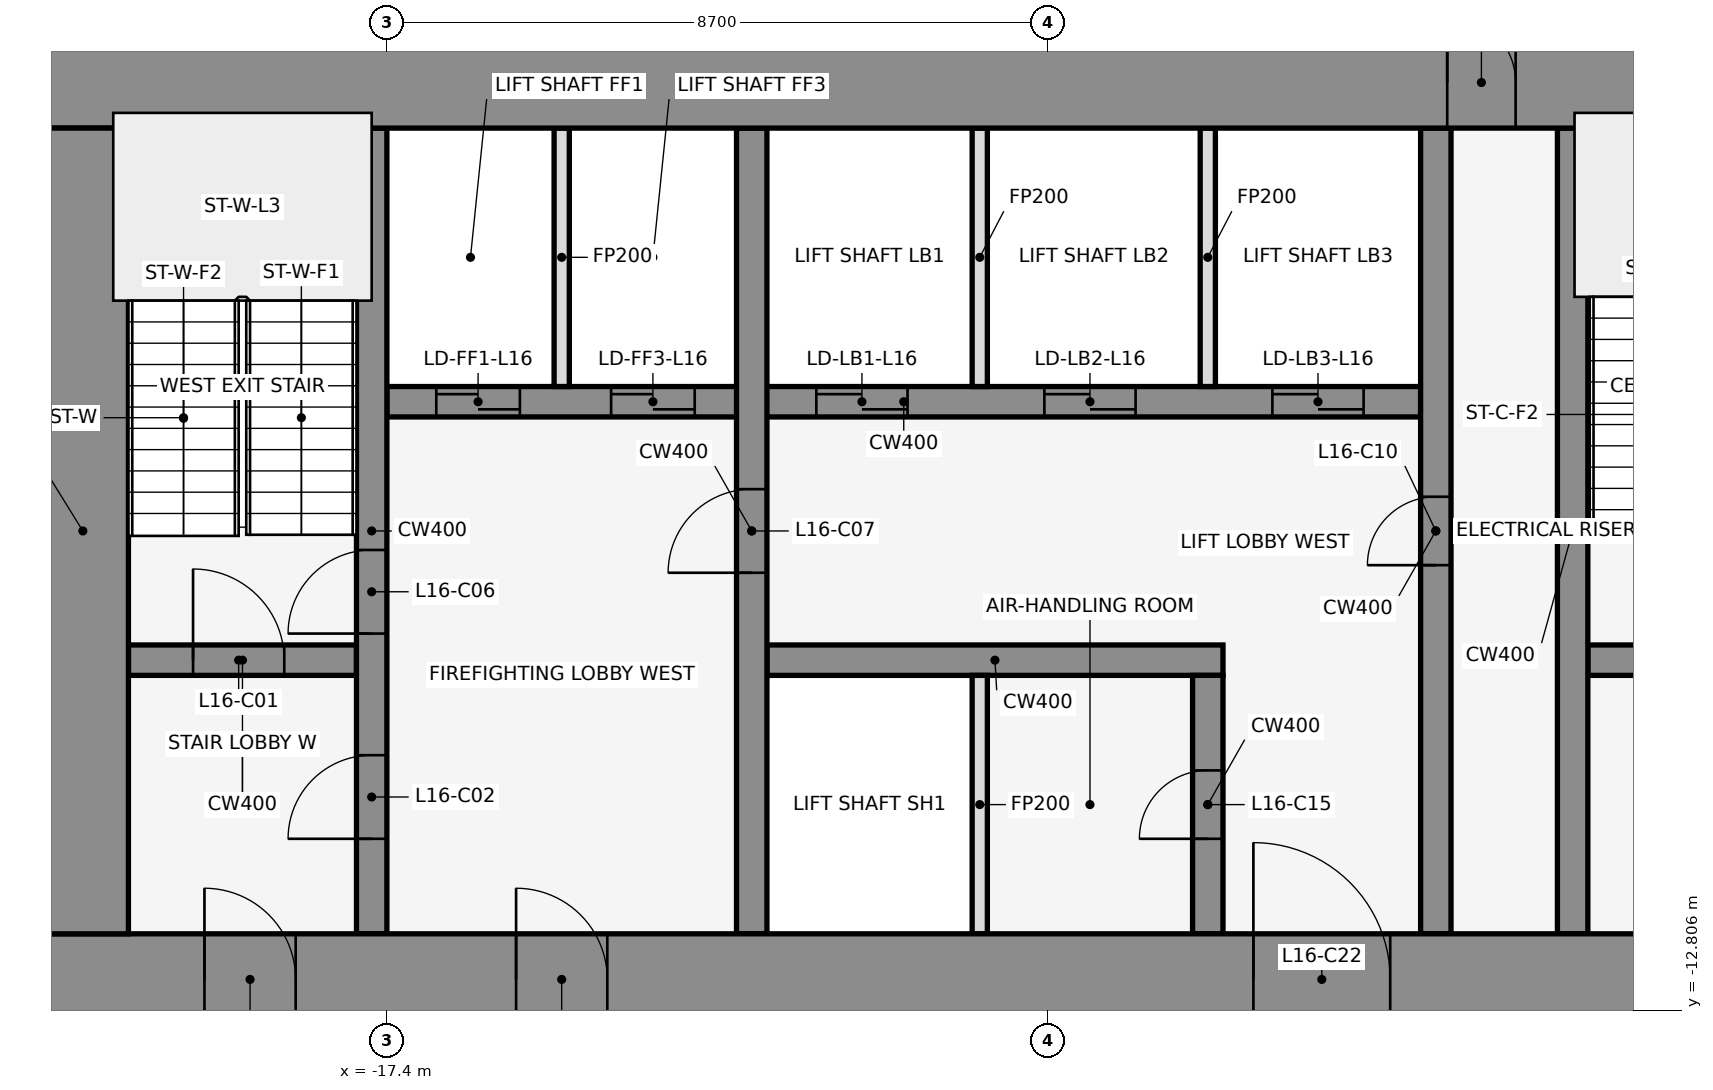
"""IFC4 building model, lengths in metres.
Left out: names, types, materials, properties, quantities, classifications, styles, units other than length and angle.
Written with IfcOpenShell. Run it as: python <this file> out.ifc"""

import sys

from ifc_helpers import new_model, si_unit, direction, frame, frame_2d, origin, place, context, subcontext, project, spatial, rectangle, extrude, element, fill, save


model = new_model("IFC4")
c1 = context("Model", 3, precision=1e-05, world=origin(), true_north=direction((0.0, 1.0)))
c2 = subcontext(c1, "Body", "Model", "MODEL_VIEW")
j1 = project(units=[si_unit("LENGTHUNIT", "METRE"), si_unit("PLANEANGLEUNIT", "RADIAN")], contexts=[c1])
p1 = place(None, origin())
s1 = spatial("IfcSite", under=j1, at=p1, CompositionType="ELEMENT")
p2 = place(p1, origin())
s2 = spatial("IfcBuilding", under=s1, at=p2, CompositionType="ELEMENT")
p3 = place(p2, frame((0.0, 0.0, 80.0)))
s3 = spatial("IfcBuildingStorey", under=s2, at=p3, CompositionType="ELEMENT", Elevation=80.0)
for number, where, z_axis, x_axis in (
    (1, (-0.068, -0.105, 0.0), (0.0, 0.0, 1.0), (-0.84, 0.543, 0.0)),
    (2, (-14.599, 1.08, 0.0), (0.0, 0.0, 1.0), (-0.84, -0.543, 0.0)),
):
    element("IfcWall", number, at=place(p3, frame(where, z_axis=z_axis, x_axis=x_axis)), inside=s3, PredefinedType="STANDARD", context=c2, shape_type="SweptSolid", body=[
        extrude(rectangle(XDim=2.183, YDim=0.25, at=frame_2d((1.091, 0.0))), origin(), (0.0, 0.0, 1.0), 4.3),
    ])
p4 = place(p3, frame((-20.8, -8.2, 0.0), z_axis=(0.0, 0.0, 1.0), x_axis=(1.0, 0.0, 0.0)))
e3 = element("IfcWall", 3, at=p4, inside=s3, PredefinedType="SHEAR", context=c2, shape_type="SweptSolid", body=[
    extrude(rectangle(XDim=3.0, YDim=0.4, at=frame_2d((1.5, 0.0))), origin(), (0.0, 0.0, 1.0), 4.5),
])
p5 = place(p4, frame((0.85, 0.0, 0.0)))
e4 = element("IfcOpeningElement", 4, at=p5, cuts=e3, PredefinedType="OPENING", context=c2, shape_type="SweptSolid", body=[
    extrude(rectangle(XDim=1.2, YDim=2.1, at=frame_2d((0.6, 1.05))), frame((0.0, 0.212, 0.0), z_axis=(0.0, -1.0, 0.0), x_axis=(1.0, 0.0, 0.0)), (0.0, 0.0, 1.0), 0.424),
])
p6 = place(p3, frame((-12.4, -8.2, 0.0), z_axis=(0.0, 0.0, 1.0), x_axis=(1.0, 0.0, 0.0)))
e5 = element("IfcWall", 5, at=p6, inside=s3, PredefinedType="SHEAR", context=c2, shape_type="SweptSolid", body=[
    extrude(rectangle(XDim=6.0, YDim=0.4, at=frame_2d((3.0, 0.0))), origin(), (0.0, 0.0, 1.0), 4.5),
])
p7 = place(p3, frame((-1.6, -8.2, 0.0), z_axis=(0.0, 0.0, 1.0), x_axis=(1.0, 0.0, 0.0)))
e6 = element("IfcWall", 6, at=p7, inside=s3, PredefinedType="SHEAR", context=c2, shape_type="SweptSolid", body=[
    extrude(rectangle(XDim=3.2, YDim=0.4, at=frame_2d((1.6, 0.0))), origin(), (0.0, 0.0, 1.0), 4.5),
])
p8 = place(p7, frame((1.05, 0.0, 0.0)))
e7 = element("IfcOpeningElement", 7, at=p8, cuts=e6, PredefinedType="OPENING", context=c2, shape_type="SweptSolid", body=[
    extrude(rectangle(XDim=1.2, YDim=2.1, at=frame_2d((0.6, 1.05))), frame((0.0, 0.212, 0.0), z_axis=(0.0, -1.0, 0.0), x_axis=(1.0, 0.0, 0.0)), (0.0, 0.0, 1.0), 0.424),
])
p9 = place(p3, frame((-17.4, -4.8, 0.0), z_axis=(0.0, 0.0, 1.0), x_axis=(1.0, 0.0, 0.0)))
e8 = element("IfcWall", 8, at=p9, inside=s3, PredefinedType="SHEAR", context=c2, shape_type="SweptSolid", body=[
    extrude(rectangle(XDim=13.6, YDim=0.4, at=frame_2d((6.8, 0.0))), origin(), (0.0, 0.0, 1.0), 4.5),
])
p10 = place(p9, frame((0.65, 0.0, 0.0)))
e9 = element("IfcOpeningElement", 9, at=p10, cuts=e8, PredefinedType="OPENING", context=c2, shape_type="SweptSolid", body=[
    extrude(rectangle(XDim=1.1, YDim=2.1, at=frame_2d((0.55, 1.05))), frame((0.0, 0.212, 0.0), z_axis=(0.0, -1.0, 0.0), x_axis=(1.0, 0.0, 0.0)), (0.0, 0.0, 1.0), 0.424),
])
p11 = place(p9, frame((2.95, 0.0, 0.0)))
e10 = element("IfcOpeningElement", 10, at=p11, cuts=e8, PredefinedType="OPENING", context=c2, shape_type="SweptSolid", body=[
    extrude(rectangle(XDim=1.1, YDim=2.1, at=frame_2d((0.55, 1.05))), frame((0.0, 0.212, 0.0), z_axis=(0.0, -1.0, 0.0), x_axis=(1.0, 0.0, 0.0)), (0.0, 0.0, 1.0), 0.424),
])
p12 = place(p9, frame((5.65, 0.0, 0.0)))
e11 = element("IfcOpeningElement", 11, at=p12, cuts=e8, PredefinedType="OPENING", context=c2, shape_type="SweptSolid", body=[
    extrude(rectangle(XDim=1.2, YDim=2.1, at=frame_2d((0.6, 1.05))), frame((0.0, 0.212, 0.0), z_axis=(0.0, -1.0, 0.0), x_axis=(1.0, 0.0, 0.0)), (0.0, 0.0, 1.0), 0.424),
])
p13 = place(p9, frame((8.65, 0.0, 0.0)))
e12 = element("IfcOpeningElement", 12, at=p13, cuts=e8, PredefinedType="OPENING", context=c2, shape_type="SweptSolid", body=[
    extrude(rectangle(XDim=1.2, YDim=2.1, at=frame_2d((0.6, 1.05))), frame((0.0, 0.212, 0.0), z_axis=(0.0, -1.0, 0.0), x_axis=(1.0, 0.0, 0.0)), (0.0, 0.0, 1.0), 0.424),
])
p14 = place(p9, frame((11.65, 0.0, 0.0)))
e13 = element("IfcOpeningElement", 13, at=p14, cuts=e8, PredefinedType="OPENING", context=c2, shape_type="SweptSolid", body=[
    extrude(rectangle(XDim=1.2, YDim=2.1, at=frame_2d((0.6, 1.05))), frame((0.0, 0.212, 0.0), z_axis=(0.0, -1.0, 0.0), x_axis=(1.0, 0.0, 0.0)), (0.0, 0.0, 1.0), 0.424),
])
p15 = place(p3, frame((-17.6, -11.8, 0.0), z_axis=(0.0, 0.0, 1.0), x_axis=(0.0, 1.0, 0.0)))
e14 = element("IfcWall", 14, at=p15, inside=s3, PredefinedType="SHEAR", context=c2, shape_type="SweptSolid", body=[
    extrude(rectangle(XDim=10.6, YDim=0.4, at=frame_2d((5.3, 0.0))), origin(), (0.0, 0.0, 1.0), 4.5),
])
p16 = place(p15, frame((1.25, 0.0, 0.0)))
e15 = element("IfcOpeningElement", 15, at=p16, cuts=e14, PredefinedType="OPENING", context=c2, shape_type="SweptSolid", body=[
    extrude(rectangle(XDim=1.1, YDim=2.1, at=frame_2d((0.55, 1.05))), frame((0.0, 0.212, 0.0), z_axis=(0.0, -1.0, 0.0), x_axis=(1.0, 0.0, 0.0)), (0.0, 0.0, 1.0), 0.424),
])
p17 = place(p15, frame((3.95, 0.0, 0.0)))
e16 = element("IfcOpeningElement", 16, at=p17, cuts=e14, PredefinedType="OPENING", context=c2, shape_type="SweptSolid", body=[
    extrude(rectangle(XDim=1.1, YDim=2.1, at=frame_2d((0.55, 1.05))), frame((0.0, 0.212, 0.0), z_axis=(0.0, -1.0, 0.0), x_axis=(1.0, 0.0, 0.0)), (0.0, 0.0, 1.0), 0.424),
])
p18 = place(p3, frame((-15.1, -4.6, 0.0), z_axis=(0.0, 0.0, 1.0), x_axis=(0.0, 1.0, 0.0)))
e17 = element("IfcWall", 17, at=p18, inside=s3, PredefinedType="PARTITIONING", context=c2, shape_type="SweptSolid", body=[
    extrude(rectangle(XDim=3.4, YDim=0.2, at=frame_2d((1.7, 0.0))), origin(), (0.0, 0.0, 1.0), 3.368),
])
p19 = place(p3, frame((-12.6, -11.8, 0.0), z_axis=(0.0, 0.0, 1.0), x_axis=(0.0, 1.0, 0.0)))
e18 = element("IfcWall", 18, at=p19, inside=s3, PredefinedType="SHEAR", context=c2, shape_type="SweptSolid", body=[
    extrude(rectangle(XDim=10.6, YDim=0.4, at=frame_2d((5.3, 0.0))), origin(), (0.0, 0.0, 1.0), 4.5),
])
p20 = place(p19, frame((4.75, 0.0, 0.0)))
e19 = element("IfcOpeningElement", 19, at=p20, cuts=e18, PredefinedType="OPENING", context=c2, shape_type="SweptSolid", body=[
    extrude(rectangle(XDim=1.1, YDim=2.1, at=frame_2d((0.55, 1.05))), frame((0.0, 0.212, 0.0), z_axis=(0.0, -1.0, 0.0), x_axis=(1.0, 0.0, 0.0)), (0.0, 0.0, 1.0), 0.424),
])
for number, where, z_axis, x_axis in (
    (20, (-9.6, -11.8, 0.0), (0.0, 0.0, 1.0), (0.0, 1.0, 0.0)),
    (21, (-9.6, -4.6, 0.0), (0.0, 0.0, 1.0), (0.0, 1.0, 0.0)),
):
    element("IfcWall", number, at=place(p3, frame(where, z_axis=z_axis, x_axis=x_axis)), inside=s3, PredefinedType="PARTITIONING", context=c2, shape_type="SweptSolid", body=[
        extrude(rectangle(XDim=3.4, YDim=0.2, at=frame_2d((1.7, 0.0))), origin(), (0.0, 0.0, 1.0), 3.368),
    ])
p21 = place(p3, frame((-6.6, -11.8, 0.0), z_axis=(0.0, 0.0, 1.0), x_axis=(0.0, 1.0, 0.0)))
e22 = element("IfcWall", 22, at=p21, inside=s3, PredefinedType="SHEAR", context=c2, shape_type="SweptSolid", body=[
    extrude(rectangle(XDim=3.4, YDim=0.4, at=frame_2d((1.7, 0.0))), origin(), (0.0, 0.0, 1.0), 4.5),
])
p22 = place(p21, frame((1.25, 0.0, 0.0)))
e23 = element("IfcOpeningElement", 23, at=p22, cuts=e22, PredefinedType="OPENING", context=c2, shape_type="SweptSolid", body=[
    extrude(rectangle(XDim=0.9, YDim=2.1, at=frame_2d((0.45, 1.05))), frame((0.0, 0.212, 0.0), z_axis=(0.0, -1.0, 0.0), x_axis=(1.0, 0.0, 0.0)), (0.0, 0.0, 1.0), 0.424),
])
p23 = place(p3, frame((-6.6, -4.6, 0.0), z_axis=(0.0, 0.0, 1.0), x_axis=(0.0, 1.0, 0.0)))
e24 = element("IfcWall", 24, at=p23, inside=s3, PredefinedType="PARTITIONING", context=c2, shape_type="SweptSolid", body=[
    extrude(rectangle(XDim=3.4, YDim=0.2, at=frame_2d((1.7, 0.0))), origin(), (0.0, 0.0, 1.0), 3.368),
])
p24 = place(p3, frame((-3.6, -11.8, 0.0), z_axis=(0.0, 0.0, 1.0), x_axis=(0.0, 1.0, 0.0)))
e25 = element("IfcWall", 25, at=p24, inside=s3, PredefinedType="SHEAR", context=c2, shape_type="SweptSolid", body=[
    extrude(rectangle(XDim=10.6, YDim=0.4, at=frame_2d((5.3, 0.0))), origin(), (0.0, 0.0, 1.0), 4.5),
])
p25 = place(p24, frame((4.85, 0.0, 0.0)))
e26 = element("IfcOpeningElement", 26, at=p25, cuts=e25, PredefinedType="OPENING", context=c2, shape_type="SweptSolid", body=[
    extrude(rectangle(XDim=0.9, YDim=2.1, at=frame_2d((0.45, 1.05))), frame((0.0, 0.212, 0.0), z_axis=(0.0, -1.0, 0.0), x_axis=(1.0, 0.0, 0.0)), (0.0, 0.0, 1.0), 0.424),
])
p26 = place(p3, frame((-1.8, -11.8, 0.0), z_axis=(0.0, 0.0, 1.0), x_axis=(0.0, 1.0, 0.0)))
e27 = element("IfcWall", 27, at=p26, inside=s3, PredefinedType="SHEAR", context=c2, shape_type="SweptSolid", body=[
    extrude(rectangle(XDim=10.6, YDim=0.4, at=frame_2d((5.3, 0.0))), origin(), (0.0, 0.0, 1.0), 4.5),
])
p27 = place(p3, frame((-22.0, -0.6, 0.0), z_axis=(0.0, 0.0, 1.0), x_axis=(1.0, 0.0, 0.0)))
e28 = element("IfcWall", 28, at=p27, inside=s3, PredefinedType="SHEAR", context=c2, shape_type="SweptSolid", body=[
    extrude(rectangle(XDim=44.0, YDim=1.2, at=frame_2d((22.0, 0.0))), origin(), (0.0, 0.0, 1.0), 4.5),
])
p28 = place(p27, frame((18.55, 0.0, 0.0)))
e29 = element("IfcOpeningElement", 29, at=p28, cuts=e28, PredefinedType="OPENING", context=c2, shape_type="SweptSolid", body=[
    extrude(rectangle(XDim=0.9, YDim=2.1, at=frame_2d((0.45, 1.05))), frame((0.0, 0.612, 0.0), z_axis=(0.0, -1.0, 0.0), x_axis=(1.0, 0.0, 0.0)), (0.0, 0.0, 1.0), 1.224),
])
p29 = place(p27, frame((24.55, 0.0, 0.0)))
e30 = element("IfcOpeningElement", 30, at=p29, cuts=e28, PredefinedType="OPENING", context=c2, shape_type="SweptSolid", body=[
    extrude(rectangle(XDim=0.9, YDim=2.1, at=frame_2d((0.45, 1.05))), frame((0.0, 0.612, 0.0), z_axis=(0.0, -1.0, 0.0), x_axis=(1.0, 0.0, 0.0)), (0.0, 0.0, 1.0), 1.224),
])
p30 = place(p3, frame((-22.0, -12.4, 0.0), z_axis=(0.0, 0.0, 1.0), x_axis=(1.0, 0.0, 0.0)))
e31 = element("IfcWall", 31, at=p30, inside=s3, PredefinedType="SHEAR", context=c2, shape_type="SweptSolid", body=[
    extrude(rectangle(XDim=44.0, YDim=1.2, at=frame_2d((22.0, 0.0))), origin(), (0.0, 0.0, 1.0), 4.5),
])
p31 = place(p30, frame((2.2, 0.0, 0.0)))
e32 = element("IfcOpeningElement", 32, at=p31, cuts=e31, PredefinedType="OPENING", context=c2, shape_type="SweptSolid", body=[
    extrude(rectangle(XDim=1.2, YDim=2.1, at=frame_2d((0.6, 1.05))), frame((0.0, 0.612, 0.0), z_axis=(0.0, -1.0, 0.0), x_axis=(1.0, 0.0, 0.0)), (0.0, 0.0, 1.0), 1.224),
])
p32 = place(p30, frame((21.4, 0.0, 0.0)))
e33 = element("IfcOpeningElement", 33, at=p32, cuts=e31, PredefinedType="OPENING", context=c2, shape_type="SweptSolid", body=[
    extrude(rectangle(XDim=1.2, YDim=2.1, at=frame_2d((0.6, 1.05))), frame((0.0, 0.612, 0.0), z_axis=(0.0, -1.0, 0.0), x_axis=(1.0, 0.0, 0.0)), (0.0, 0.0, 1.0), 1.224),
])
p33 = place(p30, frame((40.6, 0.0, 0.0)))
e34 = element("IfcOpeningElement", 34, at=p33, cuts=e31, PredefinedType="OPENING", context=c2, shape_type="SweptSolid", body=[
    extrude(rectangle(XDim=1.2, YDim=2.1, at=frame_2d((0.6, 1.05))), frame((0.0, 0.612, 0.0), z_axis=(0.0, -1.0, 0.0), x_axis=(1.0, 0.0, 0.0)), (0.0, 0.0, 1.0), 1.224),
])
p34 = place(p30, frame((16.0, 0.0, 0.0)))
e35 = element("IfcOpeningElement", 35, at=p34, cuts=e31, PredefinedType="OPENING", context=c2, shape_type="SweptSolid", body=[
    extrude(rectangle(XDim=1.8, YDim=2.1, at=frame_2d((0.9, 1.05))), frame((0.0, 0.612, 0.0), z_axis=(0.0, -1.0, 0.0), x_axis=(1.0, 0.0, 0.0)), (0.0, 0.0, 1.0), 1.224),
])
p35 = place(p30, frame((6.3, 0.0, 0.0)))
e36 = element("IfcOpeningElement", 36, at=p35, cuts=e31, PredefinedType="OPENING", context=c2, shape_type="SweptSolid", body=[
    extrude(rectangle(XDim=1.2, YDim=2.1, at=frame_2d((0.6, 1.05))), frame((0.0, 0.612, 0.0), z_axis=(0.0, -1.0, 0.0), x_axis=(1.0, 0.0, 0.0)), (0.0, 0.0, 1.0), 1.224),
])
p36 = place(p30, frame((26.2, 0.0, 0.0)))
e37 = element("IfcOpeningElement", 37, at=p36, cuts=e31, PredefinedType="OPENING", context=c2, shape_type="SweptSolid", body=[
    extrude(rectangle(XDim=1.8, YDim=2.1, at=frame_2d((0.9, 1.05))), frame((0.0, 0.612, 0.0), z_axis=(0.0, -1.0, 0.0), x_axis=(1.0, 0.0, 0.0)), (0.0, 0.0, 1.0), 1.224),
])
p37 = place(p30, frame((36.5, 0.0, 0.0)))
e38 = element("IfcOpeningElement", 38, at=p37, cuts=e31, PredefinedType="OPENING", context=c2, shape_type="SweptSolid", body=[
    extrude(rectangle(XDim=1.2, YDim=2.1, at=frame_2d((0.6, 1.05))), frame((0.0, 0.612, 0.0), z_axis=(0.0, -1.0, 0.0), x_axis=(1.0, 0.0, 0.0)), (0.0, 0.0, 1.0), 1.224),
])
p38 = place(p3, frame((-21.4, -11.8, 0.0), z_axis=(0.0, 0.0, 1.0), x_axis=(0.0, 1.0, 0.0)))
e39 = element("IfcWall", 39, at=p38, inside=s3, PredefinedType="SHEAR", context=c2, shape_type="SweptSolid", body=[
    extrude(rectangle(XDim=10.6, YDim=1.2, at=frame_2d((5.3, 0.0))), origin(), (0.0, 0.0, 1.0), 4.5),
])
p39 = place(p5, origin())
e40 = element("IfcDoor", 40, at=p39, inside=s3, OperationType="SINGLE_SWING_LEFT", PredefinedType="DOOR", context=c2, shape_type="SweptSolid", body=[
    extrude(rectangle(XDim=1.2, YDim=2.1, at=frame_2d((0.6, 1.05))), frame((0.0, 0.025, 0.0), z_axis=(0.0, -1.0, 0.0), x_axis=(1.0, 0.0, 0.0)), (0.0, 0.0, 1.0), 0.05),
])
fill(e4, e40)
p40 = place(p16, frame((1.1, 0.0, 0.0), z_axis=(0.0, 0.0, 1.0), x_axis=(-1.0, 0.0, 0.0)))
e41 = element("IfcDoor", 41, at=p40, inside=s3, OperationType="SINGLE_SWING_LEFT", PredefinedType="DOOR", context=c2, shape_type="SweptSolid", body=[
    extrude(rectangle(XDim=1.1, YDim=2.1, at=frame_2d((0.55, 1.05))), frame((0.0, 0.025, 0.0), z_axis=(0.0, -1.0, 0.0), x_axis=(1.0, 0.0, 0.0)), (0.0, 0.0, 1.0), 0.05),
])
fill(e15, e41)
p41 = place(p10, origin())
e42 = element("IfcDoor", 42, at=p41, inside=s3, OperationType="DOUBLE_DOOR_SLIDING", PredefinedType="DOOR", context=c2, shape_type="SweptSolid", body=[
    extrude(rectangle(XDim=1.1, YDim=2.1, at=frame_2d((0.55, 1.05))), frame((0.0, 0.025, 0.0), z_axis=(0.0, -1.0, 0.0), x_axis=(1.0, 0.0, 0.0)), (0.0, 0.0, 1.0), 0.05),
])
fill(e9, e42)
p42 = place(p11, origin())
e43 = element("IfcDoor", 43, at=p42, inside=s3, OperationType="DOUBLE_DOOR_SLIDING", PredefinedType="DOOR", context=c2, shape_type="SweptSolid", body=[
    extrude(rectangle(XDim=1.1, YDim=2.1, at=frame_2d((0.55, 1.05))), frame((0.0, 0.025, 0.0), z_axis=(0.0, -1.0, 0.0), x_axis=(1.0, 0.0, 0.0)), (0.0, 0.0, 1.0), 0.05),
])
fill(e10, e43)
p43 = place(p12, origin())
e44 = element("IfcDoor", 44, at=p43, inside=s3, OperationType="DOUBLE_DOOR_SLIDING", PredefinedType="DOOR", context=c2, shape_type="SweptSolid", body=[
    extrude(rectangle(XDim=1.2, YDim=2.1, at=frame_2d((0.6, 1.05))), frame((0.0, 0.025, 0.0), z_axis=(0.0, -1.0, 0.0), x_axis=(1.0, 0.0, 0.0)), (0.0, 0.0, 1.0), 0.05),
])
fill(e11, e44)
p44 = place(p13, origin())
e45 = element("IfcDoor", 45, at=p44, inside=s3, OperationType="DOUBLE_DOOR_SLIDING", PredefinedType="DOOR", context=c2, shape_type="SweptSolid", body=[
    extrude(rectangle(XDim=1.2, YDim=2.1, at=frame_2d((0.6, 1.05))), frame((0.0, 0.025, 0.0), z_axis=(0.0, -1.0, 0.0), x_axis=(1.0, 0.0, 0.0)), (0.0, 0.0, 1.0), 0.05),
])
fill(e12, e45)
p45 = place(p14, origin())
e46 = element("IfcDoor", 46, at=p45, inside=s3, OperationType="DOUBLE_DOOR_SLIDING", PredefinedType="DOOR", context=c2, shape_type="SweptSolid", body=[
    extrude(rectangle(XDim=1.2, YDim=2.1, at=frame_2d((0.6, 1.05))), frame((0.0, 0.025, 0.0), z_axis=(0.0, -1.0, 0.0), x_axis=(1.0, 0.0, 0.0)), (0.0, 0.0, 1.0), 0.05),
])
fill(e13, e46)
p46 = place(p17, frame((1.1, 0.0, 0.0), z_axis=(0.0, 0.0, 1.0), x_axis=(-1.0, 0.0, 0.0)))
e47 = element("IfcDoor", 47, at=p46, inside=s3, OperationType="SINGLE_SWING_LEFT", PredefinedType="DOOR", context=c2, shape_type="SweptSolid", body=[
    extrude(rectangle(XDim=1.1, YDim=2.1, at=frame_2d((0.55, 1.05))), frame((0.0, 0.025, 0.0), z_axis=(0.0, -1.0, 0.0), x_axis=(1.0, 0.0, 0.0)), (0.0, 0.0, 1.0), 0.05),
])
fill(e16, e47)
p47 = place(p20, origin())
e48 = element("IfcDoor", 48, at=p47, inside=s3, OperationType="SINGLE_SWING_LEFT", PredefinedType="DOOR", context=c2, shape_type="SweptSolid", body=[
    extrude(rectangle(XDim=1.1, YDim=2.1, at=frame_2d((0.55, 1.05))), frame((0.0, 0.025, 0.0), z_axis=(0.0, -1.0, 0.0), x_axis=(1.0, 0.0, 0.0)), (0.0, 0.0, 1.0), 0.05),
])
fill(e19, e48)
p48 = place(p25, frame((0.9, 0.0, 0.0), z_axis=(0.0, 0.0, 1.0), x_axis=(-1.0, 0.0, 0.0)))
e49 = element("IfcDoor", 49, at=p48, inside=s3, OperationType="SINGLE_SWING_LEFT", PredefinedType="DOOR", context=c2, shape_type="SweptSolid", body=[
    extrude(rectangle(XDim=0.9, YDim=2.1, at=frame_2d((0.45, 1.05))), frame((0.0, 0.025, 0.0), z_axis=(0.0, -1.0, 0.0), x_axis=(1.0, 0.0, 0.0)), (0.0, 0.0, 1.0), 0.05),
])
fill(e26, e49)
p49 = place(p22, origin())
e50 = element("IfcDoor", 50, at=p49, inside=s3, OperationType="SINGLE_SWING_LEFT", PredefinedType="DOOR", context=c2, shape_type="SweptSolid", body=[
    extrude(rectangle(XDim=0.9, YDim=2.1, at=frame_2d((0.45, 1.05))), frame((0.0, 0.025, 0.0), z_axis=(0.0, -1.0, 0.0), x_axis=(1.0, 0.0, 0.0)), (0.0, 0.0, 1.0), 0.05),
])
fill(e23, e50)
p50 = place(p28, origin())
e51 = element("IfcDoor", 51, at=p50, inside=s3, OperationType="SINGLE_SWING_LEFT", PredefinedType="DOOR", context=c2, shape_type="SweptSolid", body=[
    extrude(rectangle(XDim=0.9, YDim=2.1, at=frame_2d((0.45, 1.05))), frame((0.0, 0.025, 0.0), z_axis=(0.0, -1.0, 0.0), x_axis=(1.0, 0.0, 0.0)), (0.0, 0.0, 1.0), 0.05),
])
fill(e29, e51)
p51 = place(p31, frame((1.2, 0.0, 0.0), z_axis=(0.0, 0.0, 1.0), x_axis=(-1.0, 0.0, 0.0)))
e52 = element("IfcDoor", 52, at=p51, inside=s3, OperationType="SINGLE_SWING_RIGHT", PredefinedType="DOOR", context=c2, shape_type="SweptSolid", body=[
    extrude(rectangle(XDim=1.2, YDim=2.1, at=frame_2d((0.6, 1.05))), frame((0.0, 0.025, 0.0), z_axis=(0.0, -1.0, 0.0), x_axis=(1.0, 0.0, 0.0)), (0.0, 0.0, 1.0), 0.05),
])
fill(e32, e52)
p52 = place(p34, origin())
e53 = element("IfcDoor", 53, at=p52, inside=s3, OperationType="SINGLE_SWING_LEFT", PredefinedType="DOOR", context=c2, shape_type="SweptSolid", body=[
    extrude(rectangle(XDim=1.8, YDim=2.1, at=frame_2d((0.9, 1.05))), frame((0.0, 0.025, 0.0), z_axis=(0.0, -1.0, 0.0), x_axis=(1.0, 0.0, 0.0)), (0.0, 0.0, 1.0), 0.05),
])
fill(e35, e53)
p53 = place(p35, frame((1.2, 0.0, 0.0), z_axis=(0.0, 0.0, 1.0), x_axis=(-1.0, 0.0, 0.0)))
e54 = element("IfcDoor", 54, at=p53, inside=s3, OperationType="SINGLE_SWING_RIGHT", PredefinedType="DOOR", context=c2, shape_type="SweptSolid", body=[
    extrude(rectangle(XDim=1.2, YDim=2.1, at=frame_2d((0.6, 1.05))), frame((0.0, 0.025, 0.0), z_axis=(0.0, -1.0, 0.0), x_axis=(1.0, 0.0, 0.0)), (0.0, 0.0, 1.0), 0.05),
])
fill(e36, e54)
save(model, sys.argv[1])
